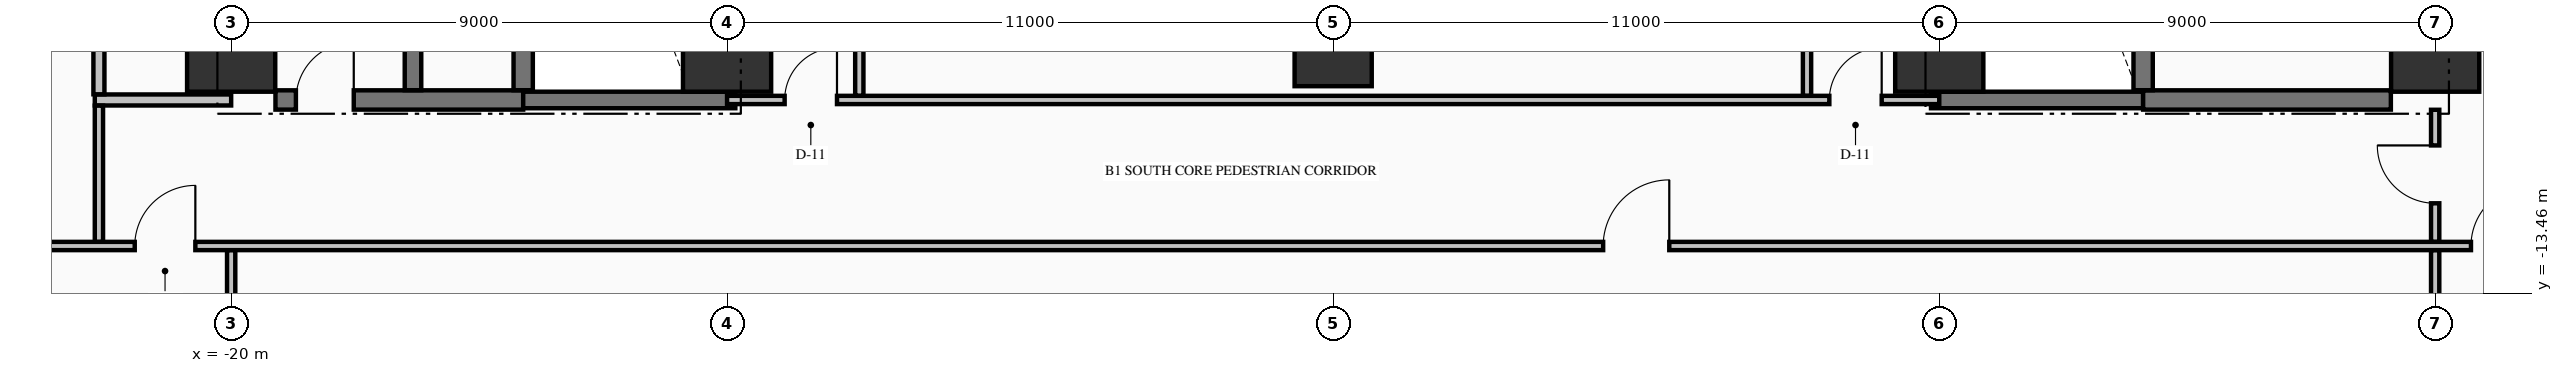
"""IFC4 building model, lengths in metres.
Left out: names, types, materials, properties, quantities, classifications, styles, units other than length and angle.
Written with IfcOpenShell. Run it as: python <this file> out.ifc"""

import sys

from ifc_helpers import new_model, si_unit, direction, frame, frame_2d, origin, origin_2d, place, context, subcontext, project, spatial, rectangle, extrude, element, fill, save


model = new_model("IFC4")
c1 = context("Model", 3, precision=1e-05, world=origin(), true_north=direction((0.0, 1.0)))
c2 = subcontext(c1, "Body", "Model", "MODEL_VIEW")
j1 = project(units=[si_unit("LENGTHUNIT", "METRE"), si_unit("PLANEANGLEUNIT", "RADIAN")], contexts=[c1])
p1 = place(None, origin())
s1 = spatial("IfcSite", under=j1, at=p1, CompositionType="ELEMENT")
p2 = place(p1, origin())
s2 = spatial("IfcBuilding", under=s1, at=p2, CompositionType="ELEMENT")
p3 = place(p2, frame((0.0, 0.0, -4.55)))
s3 = spatial("IfcBuildingStorey", under=s2, at=p3, CompositionType="ELEMENT", Elevation=-4.55)
for number, where, z_axis, x_axis in (
    (1, (-20.0, -9.0, 0.0), (0.0, 0.0, 1.0), (1.0, 0.0, 0.0)),
    (2, (-11.0, -9.0, 0.0), (0.0, 0.0, 1.0), (1.0, 0.0, 0.0)),
):
    element("IfcColumn", number, at=place(p3, frame(where, z_axis=z_axis, x_axis=x_axis)), inside=s3, PredefinedType="COLUMN", context=c2, shape_type="SweptSolid", body=[
        extrude(rectangle(XDim=1.6, YDim=1.6, at=origin_2d()), origin(), (0.0, 0.0, 1.0), 4.2),
    ])
p4 = place(p3, frame((0.0, -9.0, 0.0), z_axis=(0.0, 0.0, 1.0), x_axis=(1.0, 0.0, 0.0)))
e3 = element("IfcColumn", 3, at=p4, inside=s3, PredefinedType="COLUMN", context=c2, shape_type="SweptSolid", body=[
    extrude(rectangle(XDim=1.4, YDim=1.4, at=origin_2d()), origin(), (0.0, 0.0, 1.0), 4.2),
])
for number, where, z_axis, x_axis in (
    (4, (11.0, -9.0, 0.0), (0.0, 0.0, 1.0), (1.0, 0.0, 0.0)),
    (5, (20.0, -9.0, 0.0), (0.0, 0.0, 1.0), (1.0, 0.0, 0.0)),
):
    element("IfcColumn", number, at=place(p3, frame(where, z_axis=z_axis, x_axis=x_axis)), inside=s3, PredefinedType="COLUMN", context=c2, shape_type="SweptSolid", body=[
        extrude(rectangle(XDim=1.6, YDim=1.6, at=origin_2d()), origin(), (0.0, 0.0, 1.0), 4.2),
    ])
p5 = place(p3, frame((-19.196, -9.95, 0.0), z_axis=(0.0, 0.0, 1.0), x_axis=(1.0, 0.0, 0.0)))
e6 = element("IfcWall", 6, at=p5, inside=s3, PredefinedType="SHEAR", context=c2, shape_type="SweptSolid", body=[
    extrude(rectangle(XDim=4.496, YDim=0.35, at=frame_2d((2.248, 0.0))), origin(), (0.0, 0.0, 1.0), 4.2),
])
p6 = place(p5, frame((0.371, 0.0, 0.0)))
e7 = element("IfcOpeningElement", 7, at=p6, cuts=e6, PredefinedType="OPENING", context=c2, shape_type="SweptSolid", body=[
    extrude(rectangle(XDim=1.05, YDim=2.15, at=frame_2d((0.525, 1.075))), frame((0.0, 0.185, 0.0), z_axis=(0.0, -1.0, 0.0), x_axis=(1.0, 0.0, 0.0)), (0.0, 0.0, 1.0), 0.37),
])
for number, where, z_axis, x_axis in (
    (8, (-14.7, -9.95, 0.0), (0.0, 0.0, 1.0), (1.0, 0.0, 0.0)),
    (9, (10.85, -9.95, 0.0), (0.0, 0.0, 1.0), (1.0, 0.0, 0.0)),
):
    element("IfcWall", number, at=place(p3, frame(where, z_axis=z_axis, x_axis=x_axis)), inside=s3, PredefinedType="SHEAR", context=c2, shape_type="SweptSolid", body=[
        extrude(rectangle(XDim=3.85, YDim=0.3, at=frame_2d((1.925, 0.0))), origin(), (0.0, 0.0, 1.0), 4.2),
    ])
p7 = place(p3, frame((14.7, -9.95, 0.0), z_axis=(0.0, 0.0, 1.0), x_axis=(1.0, 0.0, 0.0)))
e10 = element("IfcWall", 10, at=p7, inside=s3, PredefinedType="SHEAR", context=c2, shape_type="SweptSolid", body=[
    extrude(rectangle(XDim=4.496, YDim=0.35, at=frame_2d((2.248, 0.0))), origin(), (0.0, 0.0, 1.0), 4.2),
])
p8 = place(p3, frame((-33.722, -12.6, 0.0), z_axis=(0.0, 0.0, 1.0), x_axis=(1.0, 0.0, 0.0)))
e11 = element("IfcWall", 11, at=p8, inside=s3, PredefinedType="PARTITIONING", context=c2, shape_type="SweptSolid", body=[
    extrude(rectangle(XDim=67.444, YDim=0.15, at=frame_2d((33.722, 0.0))), origin(), (0.0, 0.0, 1.0), 3.74),
])
p9 = place(p8, frame((11.972, 0.0, 0.0)))
e12 = element("IfcOpeningElement", 12, at=p9, cuts=e11, PredefinedType="OPENING", context=c2, shape_type="SweptSolid", body=[
    extrude(rectangle(XDim=1.1, YDim=2.15, at=frame_2d((0.55, 1.075))), frame((0.0, 0.085, 0.0), z_axis=(0.0, -1.0, 0.0), x_axis=(1.0, 0.0, 0.0)), (0.0, 0.0, 1.0), 0.17),
])
p10 = place(p8, frame((54.372, 0.0, 0.0)))
e13 = element("IfcOpeningElement", 13, at=p10, cuts=e11, PredefinedType="OPENING", context=c2, shape_type="SweptSolid", body=[
    extrude(rectangle(XDim=1.1, YDim=2.15, at=frame_2d((0.55, 1.075))), frame((0.0, 0.085, 0.0), z_axis=(0.0, -1.0, 0.0), x_axis=(1.0, 0.0, 0.0)), (0.0, 0.0, 1.0), 0.17),
])
p11 = place(p8, frame((38.622, 0.0, 0.0)))
e14 = element("IfcOpeningElement", 14, at=p11, cuts=e11, PredefinedType="OPENING", context=c2, shape_type="SweptSolid", body=[
    extrude(rectangle(XDim=1.2, YDim=2.15, at=frame_2d((0.6, 1.075))), frame((0.0, 0.085, 0.0), z_axis=(0.0, -1.0, 0.0), x_axis=(1.0, 0.0, 0.0)), (0.0, 0.0, 1.0), 0.17),
])
p12 = place(p3, frame((-22.475, -9.95, 0.0), z_axis=(0.0, 0.0, 1.0), x_axis=(1.0, 0.0, 0.0)))
e15 = element("IfcWall", 15, at=p12, inside=s3, PredefinedType="PARTITIONING", context=c2, shape_type="SweptSolid", body=[
    extrude(rectangle(XDim=2.475, YDim=0.2, at=frame_2d((1.238, 0.0))), origin(), (0.0, 0.0, 1.0), 4.2),
])
p13 = place(p3, frame((-11.0, -9.95, 0.0), z_axis=(0.0, 0.0, 1.0), x_axis=(1.0, 0.0, 0.0)))
e16 = element("IfcWall", 16, at=p13, inside=s3, PredefinedType="PARTITIONING", context=c2, shape_type="SweptSolid", body=[
    extrude(rectangle(XDim=22.0, YDim=0.15, at=frame_2d((11.0, 0.0))), origin(), (0.0, 0.0, 1.0), 4.2),
])
p14 = place(p13, frame((1.045, 0.0, 0.0)))
e17 = element("IfcOpeningElement", 17, at=p14, cuts=e16, PredefinedType="OPENING", context=c2, shape_type="SweptSolid", body=[
    extrude(rectangle(XDim=0.95, YDim=2.15, at=frame_2d((0.475, 1.075))), frame((0.0, 0.085, 0.0), z_axis=(0.0, -1.0, 0.0), x_axis=(1.0, 0.0, 0.0)), (0.0, 0.0, 1.0), 0.17),
])
p15 = place(p13, frame((20.005, 0.0, 0.0)))
e18 = element("IfcOpeningElement", 18, at=p15, cuts=e16, PredefinedType="OPENING", context=c2, shape_type="SweptSolid", body=[
    extrude(rectangle(XDim=0.95, YDim=2.15, at=frame_2d((0.475, 1.075))), frame((0.0, 0.085, 0.0), z_axis=(0.0, -1.0, 0.0), x_axis=(1.0, 0.0, 0.0)), (0.0, 0.0, 1.0), 0.17),
])
p16 = place(p3, frame((-16.7, -9.773, 0.0), z_axis=(0.0, 0.0, 1.0), x_axis=(0.0, 1.0, 0.0)))
e19 = element("IfcWall", 19, at=p16, inside=s3, PredefinedType="SHEAR", context=c2, shape_type="SweptSolid", body=[
    extrude(rectangle(XDim=9.371, YDim=0.3, at=frame_2d((4.686, 0.0))), origin(), (0.0, 0.0, 1.0), 4.2),
])
for number, where, z_axis, x_axis in (
    (20, (-14.7, -9.773, 0.0), (0.0, 0.0, 1.0), (0.0, 1.0, 0.0)),
    (21, (14.7, -9.773, 0.0), (0.0, 0.0, 1.0), (0.0, 1.0, 0.0)),
):
    element("IfcWall", number, at=place(p3, frame(where, z_axis=z_axis, x_axis=x_axis)), inside=s3, PredefinedType="SHEAR", context=c2, shape_type="SweptSolid", body=[
        extrude(rectangle(XDim=9.371, YDim=0.35, at=frame_2d((4.686, 0.0))), origin(), (0.0, 0.0, 1.0), 4.2),
    ])
p17 = place(p3, frame((-22.4, -12.522, 0.0), z_axis=(0.0, 0.0, 1.0), x_axis=(0.0, 1.0, 0.0)))
e22 = element("IfcWall", 22, at=p17, inside=s3, PredefinedType="PARTITIONING", context=c2, shape_type="SweptSolid", body=[
    extrude(rectangle(XDim=2.469, YDim=0.15, at=frame_2d((1.234, 0.0))), origin(), (0.0, 0.0, 1.0), 4.2),
])
p18 = place(p3, frame((-22.4, -9.847, 0.0), z_axis=(0.0, 0.0, 1.0), x_axis=(0.0, 1.0, 0.0)))
e23 = element("IfcWall", 23, at=p18, inside=s3, PredefinedType="PARTITIONING", context=c2, shape_type="SweptSolid", body=[
    extrude(rectangle(XDim=0.894, YDim=0.2, at=frame_2d((0.447, 0.0))), origin(), (0.0, 0.0, 1.0), 4.2),
])
p19 = place(p3, frame((-20.0, -15.194, 0.0), z_axis=(0.0, 0.0, 1.0), x_axis=(0.0, 1.0, 0.0)))
e24 = element("IfcWall", 24, at=p19, inside=s3, PredefinedType="PARTITIONING", context=c2, shape_type="SweptSolid", body=[
    extrude(rectangle(XDim=2.516, YDim=0.15, at=frame_2d((1.258, 0.0))), origin(), (0.0, 0.0, 1.0), 4.2),
])
for number, where, z_axis, x_axis in (
    (25, (-8.6, -9.872, 0.0), (0.0, 0.0, 1.0), (0.0, 1.0, 0.0)),
    (26, (8.6, -9.872, 0.0), (0.0, 0.0, 1.0), (0.0, 1.0, 0.0)),
):
    element("IfcWall", number, at=place(p3, frame(where, z_axis=z_axis, x_axis=x_axis)), inside=s3, PredefinedType="PARTITIONING", context=c2, shape_type="SweptSolid", body=[
        extrude(rectangle(XDim=9.266, YDim=0.15, at=frame_2d((4.633, 0.0))), origin(), (0.0, 0.0, 1.0), 3.242),
    ])
p20 = place(p3, frame((20.0, -15.194, 0.0), z_axis=(0.0, 0.0, 1.0), x_axis=(0.0, 1.0, 0.0)))
e27 = element("IfcWall", 27, at=p20, inside=s3, PredefinedType="PARTITIONING", context=c2, shape_type="SweptSolid", body=[
    extrude(rectangle(XDim=2.516, YDim=0.15, at=frame_2d((1.258, 0.0))), origin(), (0.0, 0.0, 1.0), 3.242),
])
p21 = place(p3, frame((20.0, -12.522, 0.0), z_axis=(0.0, 0.0, 1.0), x_axis=(0.0, 1.0, 0.0)))
e28 = element("IfcWall", 28, at=p21, inside=s3, PredefinedType="PARTITIONING", context=c2, shape_type="SweptSolid", body=[
    extrude(rectangle(XDim=2.394, YDim=0.15, at=frame_2d((1.197, 0.0))), origin(), (0.0, 0.0, 1.0), 3.242),
])
p22 = place(p21, frame((0.697, 0.0, 0.0)))
e29 = element("IfcOpeningElement", 29, at=p22, cuts=e28, PredefinedType="OPENING", context=c2, shape_type="SweptSolid", body=[
    extrude(rectangle(XDim=1.05, YDim=2.15, at=frame_2d((0.525, 1.075))), frame((0.0, 0.085, 0.0), z_axis=(0.0, -1.0, 0.0), x_axis=(1.0, 0.0, 0.0)), (0.0, 0.0, 1.0), 0.17),
])
p23 = place(p6, origin())
e30 = element("IfcDoor", 30, at=p23, inside=s3, OperationType="SINGLE_SWING_RIGHT", PredefinedType="DOOR", context=c2, shape_type="SweptSolid", body=[
    extrude(rectangle(XDim=1.05, YDim=2.15, at=frame_2d((0.525, 1.075))), frame((0.0, 0.025, 0.0), z_axis=(0.0, -1.0, 0.0), x_axis=(1.0, 0.0, 0.0)), (0.0, 0.0, 1.0), 0.05),
])
fill(e7, e30)
p24 = place(p14, origin())
e31 = element("IfcDoor", 31, at=p24, inside=s3, OperationType="SINGLE_SWING_RIGHT", PredefinedType="DOOR", context=c2, shape_type="SweptSolid", body=[
    extrude(rectangle(XDim=0.95, YDim=2.15, at=frame_2d((0.475, 1.075))), frame((0.0, 0.025, 0.0), z_axis=(0.0, -1.0, 0.0), x_axis=(1.0, 0.0, 0.0)), (0.0, 0.0, 1.0), 0.05),
])
fill(e17, e31)
p25 = place(p15, origin())
e32 = element("IfcDoor", 32, at=p25, inside=s3, OperationType="SINGLE_SWING_RIGHT", PredefinedType="DOOR", context=c2, shape_type="SweptSolid", body=[
    extrude(rectangle(XDim=0.95, YDim=2.15, at=frame_2d((0.475, 1.075))), frame((0.0, 0.025, 0.0), z_axis=(0.0, -1.0, 0.0), x_axis=(1.0, 0.0, 0.0)), (0.0, 0.0, 1.0), 0.05),
])
fill(e18, e32)
p26 = place(p9, origin())
e33 = element("IfcDoor", 33, at=p26, inside=s3, OperationType="SINGLE_SWING_RIGHT", PredefinedType="DOOR", context=c2, shape_type="SweptSolid", body=[
    extrude(rectangle(XDim=1.1, YDim=2.15, at=frame_2d((0.55, 1.075))), frame((0.0, 0.025, 0.0), z_axis=(0.0, -1.0, 0.0), x_axis=(1.0, 0.0, 0.0)), (0.0, 0.0, 1.0), 0.05),
])
fill(e12, e33)
p27 = place(p22, origin())
e34 = element("IfcDoor", 34, at=p27, inside=s3, OperationType="SINGLE_SWING_RIGHT", PredefinedType="DOOR", context=c2, shape_type="SweptSolid", body=[
    extrude(rectangle(XDim=1.05, YDim=2.15, at=frame_2d((0.525, 1.075))), frame((0.0, 0.025, 0.0), z_axis=(0.0, -1.0, 0.0), x_axis=(1.0, 0.0, 0.0)), (0.0, 0.0, 1.0), 0.05),
])
fill(e29, e34)
p28 = place(p10, origin())
e35 = element("IfcDoor", 35, at=p28, inside=s3, OperationType="SINGLE_SWING_RIGHT", PredefinedType="DOOR", context=c2, shape_type="SweptSolid", body=[
    extrude(rectangle(XDim=1.1, YDim=2.15, at=frame_2d((0.55, 1.075))), frame((0.0, 0.025, 0.0), z_axis=(0.0, -1.0, 0.0), x_axis=(1.0, 0.0, 0.0)), (0.0, 0.0, 1.0), 0.05),
])
fill(e13, e35)
p29 = place(p11, origin())
e36 = element("IfcDoor", 36, at=p29, inside=s3, OperationType="SINGLE_SWING_RIGHT", PredefinedType="DOOR", context=c2, shape_type="SweptSolid", body=[
    extrude(rectangle(XDim=1.2, YDim=2.15, at=frame_2d((0.6, 1.075))), frame((0.0, 0.025, 0.0), z_axis=(0.0, -1.0, 0.0), x_axis=(1.0, 0.0, 0.0)), (0.0, 0.0, 1.0), 0.05),
])
fill(e14, e36)
save(model, sys.argv[1])
